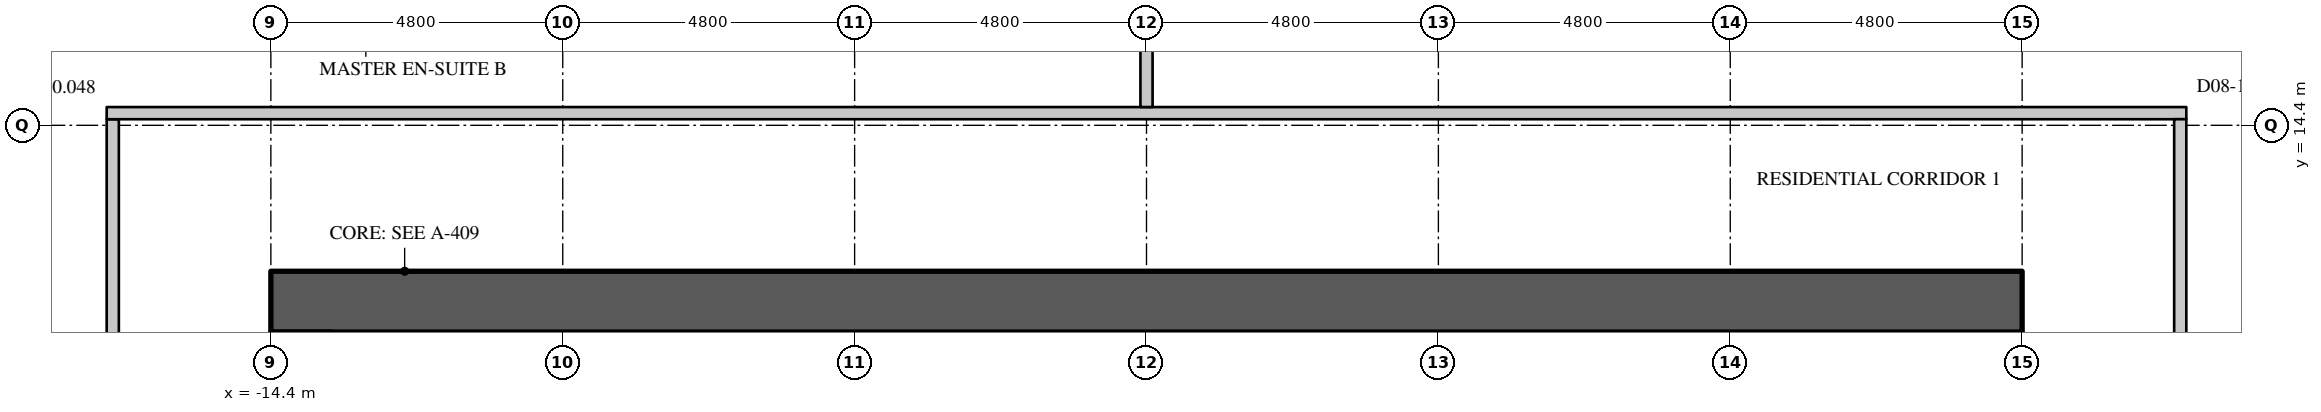
"""IFC4 building model, lengths in metres.
Left out: names, types, materials, properties, quantities, classifications, styles, units other than length and angle.
Written with IfcOpenShell. Run it as: python <this file> out.ifc"""

import sys

from ifc_helpers import new_model, si_unit, direction, frame, frame_2d, origin, place, context, subcontext, project, spatial, rectangle, extrude, element, save


model = new_model("IFC4")
c1 = context("Model", 3, precision=1e-05, world=origin(), true_north=direction((0.0, 1.0)))
c2 = subcontext(c1, "Body", "Model", "MODEL_VIEW")
j1 = project(units=[si_unit("LENGTHUNIT", "METRE"), si_unit("PLANEANGLEUNIT", "RADIAN")], contexts=[c1])
p1 = place(None, origin())
s1 = spatial("IfcSite", under=j1, at=p1, CompositionType="ELEMENT")
p2 = place(p1, origin())
s2 = spatial("IfcBuilding", under=s1, at=p2, CompositionType="ELEMENT")
p3 = place(p2, frame((0.0, 0.0, 38.1)))
s3 = spatial("IfcBuildingStorey", under=s2, at=p3, CompositionType="ELEMENT", Elevation=38.1)
p4 = place(p3, frame((-14.4, 11.5, 0.0), z_axis=(0.0, 0.0, 1.0), x_axis=(1.0, 0.0, 0.0)))
e1 = element("IfcWall", 1, at=p4, inside=s3, PredefinedType="SHEAR", context=c2, shape_type="SweptSolid", body=[
    extrude(rectangle(XDim=28.8, YDim=1.0, at=frame_2d((14.4, 0.0))), origin(), (0.0, 0.0, 1.0), 4.2),
])
p5 = place(p3, frame((-17.0, -14.5, 0.0), z_axis=(0.0, 0.0, 1.0), x_axis=(0.0, 1.0, 0.0)))
e2 = element("IfcWall", 2, at=p5, inside=s3, PredefinedType="PARTITIONING", context=c2, shape_type="SweptSolid", body=[
    extrude(rectangle(XDim=29.0, YDim=0.2, at=frame_2d((14.5, 0.0))), origin(), (0.0, 0.0, 1.0), 3.95),
])
p6 = place(p5, frame((16.55, 0.0, 0.0)))
e3 = element("IfcOpeningElement", 3, at=p6, cuts=e2, PredefinedType="OPENING", context=c2, shape_type="SweptSolid", body=[
    extrude(rectangle(XDim=1.1, YDim=2.4, at=frame_2d((0.55, 1.2))), frame((0.0, 0.11, 0.0), z_axis=(0.0, -1.0, 0.0), x_axis=(1.0, 0.0, 0.0)), (0.0, 0.0, 1.0), 0.22),
])
p7 = place(p3, frame((-17.1, 14.6, 0.0), z_axis=(0.0, 0.0, 1.0), x_axis=(1.0, 0.0, 0.0)))
e4 = element("IfcWall", 4, at=p7, inside=s3, PredefinedType="PARTITIONING", context=c2, shape_type="SweptSolid", body=[
    extrude(rectangle(XDim=34.2, YDim=0.2, at=frame_2d((17.1, 0.0))), origin(), (0.0, 0.0, 1.0), 3.95),
])
p8 = place(p3, frame((17.0, -14.5, 0.0), z_axis=(0.0, 0.0, 1.0), x_axis=(0.0, 1.0, 0.0)))
e5 = element("IfcWall", 5, at=p8, inside=s3, PredefinedType="PARTITIONING", context=c2, shape_type="SweptSolid", body=[
    extrude(rectangle(XDim=29.0, YDim=0.2, at=frame_2d((14.5, 0.0))), origin(), (0.0, 0.0, 1.0), 3.95),
])
p9 = place(p8, frame((15.9, 0.0, 0.0)))
e6 = element("IfcOpeningElement", 6, at=p9, cuts=e5, PredefinedType="OPENING", context=c2, shape_type="SweptSolid", body=[
    extrude(rectangle(XDim=1.1, YDim=2.4, at=frame_2d((0.55, 1.2))), frame((0.0, 0.11, 0.0), z_axis=(0.0, -1.0, 0.0), x_axis=(1.0, 0.0, 0.0)), (0.0, 0.0, 1.0), 0.22),
])
p10 = place(p8, frame((6.55, 0.0, 0.0)))
e7 = element("IfcOpeningElement", 7, at=p10, cuts=e5, PredefinedType="OPENING", context=c2, shape_type="SweptSolid", body=[
    extrude(rectangle(XDim=1.1, YDim=2.4, at=frame_2d((0.55, 1.2))), frame((0.0, 0.11, 0.0), z_axis=(0.0, -1.0, 0.0), x_axis=(1.0, 0.0, 0.0)), (0.0, 0.0, 1.0), 0.22),
])
p11 = place(p3, frame((-22.547, 11.885, 0.0), z_axis=(0.0, 0.0, 1.0), x_axis=(0.707106781187, 0.707106781187, 0.0)))
e8 = element("IfcWall", 8, at=p11, inside=s3, PredefinedType="PARTITIONING", context=c2, shape_type="SweptSolid", body=[
    extrude(rectangle(XDim=7.464, YDim=0.15, at=frame_2d((3.732, 0.0))), origin(), (0.0, 0.0, 1.0), 3.95),
])
p12 = place(p11, frame((3.95, 0.0, 0.0)))
e9 = element("IfcOpeningElement", 9, at=p12, cuts=e8, PredefinedType="OPENING", context=c2, shape_type="SweptSolid", body=[
    extrude(rectangle(XDim=0.95, YDim=2.2, at=frame_2d((0.475, 1.1))), frame((0.0, 0.085, 0.0), z_axis=(0.0, -1.0, 0.0), x_axis=(1.0, 0.0, 0.0)), (0.0, 0.0, 1.0), 0.17),
])
p13 = place(p3, frame((17.163, 17.269, 0.0), z_axis=(0.0, 0.0, 1.0), x_axis=(0.707106781187, -0.707106781187, 0.0)))
e10 = element("IfcWall", 10, at=p13, inside=s3, PredefinedType="PARTITIONING", context=c2, shape_type="SweptSolid", body=[
    extrude(rectangle(XDim=5.241, YDim=0.15, at=frame_2d((2.621, 0.0))), origin(), (0.0, 0.0, 1.0), 3.95),
])
p14 = place(p13, frame((2.7, 0.0, 0.0)))
e11 = element("IfcOpeningElement", 11, at=p14, cuts=e10, PredefinedType="OPENING", context=c2, shape_type="SweptSolid", body=[
    extrude(rectangle(XDim=0.95, YDim=2.2, at=frame_2d((0.475, 1.1))), frame((0.0, 0.085, 0.0), z_axis=(0.0, -1.0, 0.0), x_axis=(1.0, 0.0, 0.0)), (0.0, 0.0, 1.0), 0.17),
])
p15 = place(p3, frame((0.0, 14.7, 0.0), z_axis=(0.0, 0.0, 1.0), x_axis=(0.0, 1.0, 0.0)))
e12 = element("IfcWall", 12, at=p15, inside=s3, PredefinedType="PARTITIONING", context=c2, shape_type="SweptSolid", body=[
    extrude(rectangle(XDim=14.155, YDim=0.2, at=frame_2d((7.078, 0.0))), origin(), (0.0, 0.0, 1.0), 3.95),
])
save(model, sys.argv[1])
